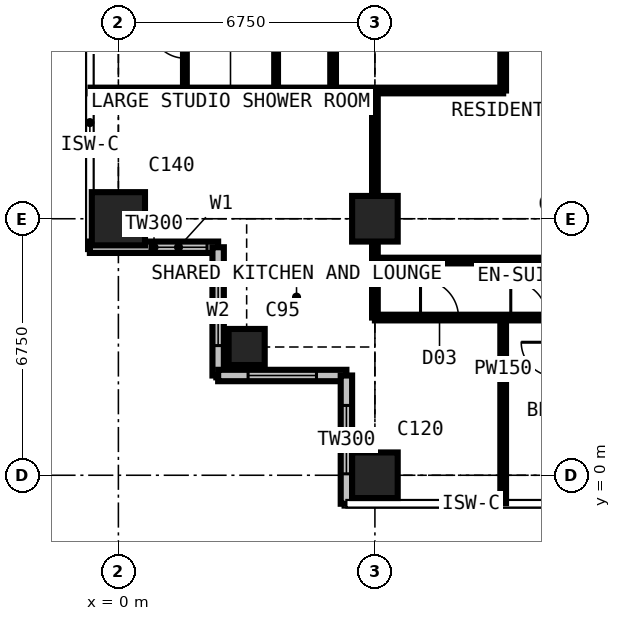
"""IFC4 building model, lengths in metres.
Left out: names, types, materials, properties, quantities, classifications, styles, units other than length and angle.
Written with IfcOpenShell. Run it as: python <this file> out.ifc"""

import sys

from ifc_helpers import new_model, si_unit, direction, frame, frame_2d, origin, origin_2d, place, context, subcontext, project, spatial, rectangle, extrude, element, fill, save


model = new_model("IFC4")
c1 = context("Model", 3, precision=1e-05, world=origin(), true_north=direction((0.0, 1.0)))
c2 = subcontext(c1, "Body", "Model", "MODEL_VIEW")
j1 = project(units=[si_unit("LENGTHUNIT", "METRE"), si_unit("PLANEANGLEUNIT", "RADIAN")], contexts=[c1])
p1 = place(None, origin())
s1 = spatial("IfcSite", under=j1, at=p1, CompositionType="ELEMENT")
p2 = place(p1, origin())
s2 = spatial("IfcBuilding", under=s1, at=p2, CompositionType="ELEMENT")
p3 = place(p2, frame((0.0, 0.0, 196.2)))
s3 = spatial("IfcBuildingStorey", under=s2, at=p3, CompositionType="ELEMENT", Elevation=196.2)
p4 = place(p3, frame((0.0, 6.75, 0.0), z_axis=(0.0, 0.0, 1.0), x_axis=(1.0, 0.0, 0.0)))
e1 = element("IfcColumn", 1, at=p4, inside=s3, PredefinedType="COLUMN", context=c2, shape_type="SweptSolid", body=[
    extrude(rectangle(XDim=1.4, YDim=1.4, at=origin_2d()), origin(), (0.0, 0.0, 1.0), 3.6),
])
p5 = place(p3, frame((3.375, 3.375, 0.0), z_axis=(0.0, 0.0, 1.0), x_axis=(1.0, 0.0, 0.0)))
e2 = element("IfcColumn", 2, at=p5, inside=s3, PredefinedType="COLUMN", context=c2, shape_type="SweptSolid", body=[
    extrude(rectangle(XDim=0.95, YDim=0.95, at=origin_2d()), origin(), (0.0, 0.0, 1.0), 3.6),
])
for number, where, z_axis, x_axis in (
    (3, (6.75, 0.0, 0.0), (0.0, 0.0, 1.0), (1.0, 0.0, 0.0)),
    (4, (6.75, 6.75, 0.0), (0.0, 0.0, 1.0), (1.0, 0.0, 0.0)),
):
    element("IfcColumn", number, at=place(p3, frame(where, z_axis=z_axis, x_axis=x_axis)), inside=s3, PredefinedType="COLUMN", context=c2, shape_type="SweptSolid", body=[
        extrude(rectangle(XDim=1.2, YDim=1.2, at=origin_2d()), origin(), (0.0, 0.0, 1.0), 3.6),
    ])
p6 = place(p3, frame((-0.75, 6.0, 0.0), z_axis=(0.0, 0.0, 1.0), x_axis=(1.0, 0.0, 0.0)))
e5 = element("IfcWall", 5, at=p6, inside=s3, PredefinedType="SOLIDWALL", context=c2, shape_type="SweptSolid", body=[
    extrude(rectangle(XDim=3.375, YDim=0.3, at=frame_2d((1.688, 0.0))), origin(), (0.0, 0.0, 1.0), 3.3),
])
p7 = place(p6, frame((1.583, 0.0, 0.9)))
e6 = element("IfcOpeningElement", 6, at=p7, cuts=e5, PredefinedType="OPENING", context=c2, shape_type="SweptSolid", body=[
    extrude(rectangle(XDim=1.5, YDim=1.8, at=frame_2d((0.75, 0.9))), frame((0.0, 0.16, 0.0), z_axis=(0.0, -1.0, 0.0), x_axis=(1.0, 0.0, 0.0)), (0.0, 0.0, 1.0), 0.32),
])
p8 = place(p3, frame((2.625, 6.0, 0.0), z_axis=(0.0, 0.0, 1.0), x_axis=(0.0, -1.0, 0.0)))
e7 = element("IfcWall", 7, at=p8, inside=s3, PredefinedType="SOLIDWALL", context=c2, shape_type="SweptSolid", body=[
    extrude(rectangle(XDim=3.375, YDim=0.3, at=frame_2d((1.688, 0.0))), origin(), (0.0, 0.0, 1.0), 3.3),
])
p9 = place(p8, frame((0.788, 0.0, 0.6)))
e8 = element("IfcOpeningElement", 8, at=p9, cuts=e7, PredefinedType="OPENING", context=c2, shape_type="SweptSolid", body=[
    extrude(rectangle(XDim=1.8, YDim=2.1, at=frame_2d((0.9, 1.05))), frame((0.0, 0.16, 0.0), z_axis=(0.0, -1.0, 0.0), x_axis=(1.0, 0.0, 0.0)), (0.0, 0.0, 1.0), 0.32),
])
p10 = place(p3, frame((2.625, 2.625, 0.0), z_axis=(0.0, 0.0, 1.0), x_axis=(1.0, 0.0, 0.0)))
e9 = element("IfcWall", 9, at=p10, inside=s3, PredefinedType="SOLIDWALL", context=c2, shape_type="SweptSolid", body=[
    extrude(rectangle(XDim=3.375, YDim=0.3, at=frame_2d((1.688, 0.0))), origin(), (0.0, 0.0, 1.0), 3.3),
])
p11 = place(p10, frame((0.788, 0.0, 0.6)))
e10 = element("IfcOpeningElement", 10, at=p11, cuts=e9, PredefinedType="OPENING", context=c2, shape_type="SweptSolid", body=[
    extrude(rectangle(XDim=1.8, YDim=2.1, at=frame_2d((0.9, 1.05))), frame((0.0, 0.16, 0.0), z_axis=(0.0, -1.0, 0.0), x_axis=(1.0, 0.0, 0.0)), (0.0, 0.0, 1.0), 0.32),
])
p12 = place(p3, frame((6.0, 2.625, 0.0), z_axis=(0.0, 0.0, 1.0), x_axis=(0.0, -1.0, 0.0)))
e11 = element("IfcWall", 11, at=p12, inside=s3, PredefinedType="SOLIDWALL", context=c2, shape_type="SweptSolid", body=[
    extrude(rectangle(XDim=3.375, YDim=0.3, at=frame_2d((1.688, 0.0))), origin(), (0.0, 0.0, 1.0), 3.3),
])
p13 = place(p12, frame((0.788, 0.0, 0.6)))
e12 = element("IfcOpeningElement", 12, at=p13, cuts=e11, PredefinedType="OPENING", context=c2, shape_type="SweptSolid", body=[
    extrude(rectangle(XDim=1.8, YDim=2.1, at=frame_2d((0.9, 1.05))), frame((0.0, 0.16, 0.0), z_axis=(0.0, -1.0, 0.0), x_axis=(1.0, 0.0, 0.0)), (0.0, 0.0, 1.0), 0.32),
])
p14 = place(p3, frame((-0.734, 10.125, 0.0), z_axis=(0.0, 0.0, 1.0), x_axis=(1.0, 0.0, 0.0)))
e13 = element("IfcWall", 13, at=p14, inside=s3, PredefinedType="PARTITIONING", context=c2, shape_type="SweptSolid", body=[
    extrude(rectangle(XDim=10.859, YDim=0.15, at=frame_2d((5.429, 0.0))), origin(), (0.0, 0.0, 1.0), 3.3),
])
p15 = place(p3, frame((1.75, 10.125, 0.0), z_axis=(0.0, 0.0, 1.0), x_axis=(0.0, 1.0, 0.0)))
e14 = element("IfcWall", 14, at=p15, inside=s3, PredefinedType="PARTITIONING", context=c2, shape_type="SweptSolid", body=[
    extrude(rectangle(XDim=2.6, YDim=0.1, at=frame_2d((1.3, 0.0))), origin(), (0.0, 0.0, 1.0), 3.3),
])
p16 = place(p15, frame((0.85, 0.0, 0.0)))
e15 = element("IfcOpeningElement", 15, at=p16, cuts=e14, PredefinedType="OPENING", context=c2, shape_type="SweptSolid", body=[
    extrude(rectangle(XDim=0.9, YDim=2.2, at=frame_2d((0.45, 1.1))), frame((0.0, 0.06, 0.0), z_axis=(0.0, -1.0, 0.0), x_axis=(1.0, 0.0, 0.0)), (0.0, 0.0, 1.0), 0.12),
])
p17 = place(p3, frame((4.15, 10.125, 0.0), z_axis=(0.0, 0.0, 1.0), x_axis=(0.0, 1.0, 0.0)))
e16 = element("IfcWall", 16, at=p17, inside=s3, PredefinedType="PARTITIONING", context=c2, shape_type="SweptSolid", body=[
    extrude(rectangle(XDim=16.875, YDim=0.1, at=frame_2d((8.438, 0.0))), origin(), (0.0, 0.0, 1.0), 3.3),
])
p18 = place(p17, frame((4.2, 0.0, 0.0)))
e17 = element("IfcOpeningElement", 17, at=p18, cuts=e16, PredefinedType="OPENING", context=c2, shape_type="SweptSolid", body=[
    extrude(rectangle(XDim=0.95, YDim=2.2, at=frame_2d((0.475, 1.1))), frame((0.0, 0.06, 0.0), z_axis=(0.0, -1.0, 0.0), x_axis=(1.0, 0.0, 0.0)), (0.0, 0.0, 1.0), 0.12),
])
p19 = place(p17, frame((10.95, 0.0, 0.0)))
e18 = element("IfcOpeningElement", 18, at=p19, cuts=e16, PredefinedType="OPENING", context=c2, shape_type="SweptSolid", body=[
    extrude(rectangle(XDim=0.95, YDim=2.2, at=frame_2d((0.475, 1.1))), frame((0.0, 0.06, 0.0), z_axis=(0.0, -1.0, 0.0), x_axis=(1.0, 0.0, 0.0)), (0.0, 0.0, 1.0), 0.12),
])
p20 = place(p3, frame((5.65, 10.125, 0.0), z_axis=(0.0, 0.0, 1.0), x_axis=(0.0, 1.0, 0.0)))
e19 = element("IfcWall", 19, at=p20, inside=s3, PredefinedType="PARTITIONING", context=c2, shape_type="SweptSolid", body=[
    extrude(rectangle(XDim=10.762, YDim=0.15, at=frame_2d((5.381, 0.0))), origin(), (0.0, 0.0, 1.0), 3.3),
])
p21 = place(p20, frame((4.9, 0.0, 0.0)))
e20 = element("IfcOpeningElement", 20, at=p21, cuts=e19, PredefinedType="OPENING", context=c2, shape_type="SweptSolid", body=[
    extrude(rectangle(XDim=0.95, YDim=2.2, at=frame_2d((0.475, 1.1))), frame((0.0, 0.085, 0.0), z_axis=(0.0, -1.0, 0.0), x_axis=(1.0, 0.0, 0.0)), (0.0, 0.0, 1.0), 0.17),
])
p22 = place(p3, frame((6.75, 4.15, 0.0), z_axis=(0.0, 0.0, 1.0), x_axis=(0.0, 1.0, 0.0)))
e21 = element("IfcWall", 21, at=p22, inside=s3, PredefinedType="PARTITIONING", context=c2, shape_type="SweptSolid", body=[
    extrude(rectangle(XDim=5.975, YDim=0.15, at=frame_2d((2.988, 0.0))), origin(), (0.0, 0.0, 1.0), 2.802),
])
p23 = place(p3, frame((6.75, 4.15, 0.0), z_axis=(0.0, 0.0, 1.0), x_axis=(1.0, 0.0, 0.0)))
e22 = element("IfcWall", 22, at=p23, inside=s3, PredefinedType="PARTITIONING", context=c2, shape_type="SweptSolid", body=[
    extrude(rectangle(XDim=20.25, YDim=0.15, at=frame_2d((10.125, 0.0))), origin(), (0.0, 0.0, 1.0), 3.3),
])
p24 = place(p23, frame((1.2, 0.0, 0.0)))
e23 = element("IfcOpeningElement", 23, at=p24, cuts=e22, PredefinedType="OPENING", context=c2, shape_type="SweptSolid", body=[
    extrude(rectangle(XDim=1.0, YDim=2.2, at=frame_2d((0.5, 1.1))), frame((0.0, 0.085, 0.0), z_axis=(0.0, -1.0, 0.0), x_axis=(1.0, 0.0, 0.0)), (0.0, 0.0, 1.0), 0.17),
])
p25 = place(p23, frame((3.575, 0.0, 0.0)))
e24 = element("IfcOpeningElement", 24, at=p25, cuts=e22, PredefinedType="OPENING", context=c2, shape_type="SweptSolid", body=[
    extrude(rectangle(XDim=0.95, YDim=2.2, at=frame_2d((0.475, 1.1))), frame((0.0, 0.085, 0.0), z_axis=(0.0, -1.0, 0.0), x_axis=(1.0, 0.0, 0.0)), (0.0, 0.0, 1.0), 0.17),
])
p26 = place(p23, frame((7.0, 0.0, 0.0)))
e25 = element("IfcOpeningElement", 25, at=p26, cuts=e22, PredefinedType="OPENING", context=c2, shape_type="SweptSolid", body=[
    extrude(rectangle(XDim=0.95, YDim=2.2, at=frame_2d((0.475, 1.1))), frame((0.0, 0.085, 0.0), z_axis=(0.0, -1.0, 0.0), x_axis=(1.0, 0.0, 0.0)), (0.0, 0.0, 1.0), 0.17),
])
p27 = place(p23, frame((10.375, 0.0, 0.0)))
e26 = element("IfcOpeningElement", 26, at=p27, cuts=e22, PredefinedType="OPENING", context=c2, shape_type="SweptSolid", body=[
    extrude(rectangle(XDim=0.95, YDim=2.2, at=frame_2d((0.475, 1.1))), frame((0.0, 0.085, 0.0), z_axis=(0.0, -1.0, 0.0), x_axis=(1.0, 0.0, 0.0)), (0.0, 0.0, 1.0), 0.17),
])
p28 = place(p23, frame((15.1, 0.0, 0.0)))
e27 = element("IfcOpeningElement", 27, at=p28, cuts=e22, PredefinedType="OPENING", context=c2, shape_type="SweptSolid", body=[
    extrude(rectangle(XDim=0.95, YDim=2.2, at=frame_2d((0.475, 1.1))), frame((0.0, 0.085, 0.0), z_axis=(0.0, -1.0, 0.0), x_axis=(1.0, 0.0, 0.0)), (0.0, 0.0, 1.0), 0.17),
])
p29 = place(p3, frame((6.75, 5.65, 0.0), z_axis=(0.0, 0.0, 1.0), x_axis=(1.0, 0.0, 0.0)))
e28 = element("IfcWall", 28, at=p29, inside=s3, PredefinedType="PARTITIONING", context=c2, shape_type="SweptSolid", body=[
    extrude(rectangle(XDim=11.05, YDim=0.15, at=frame_2d((5.525, 0.0))), origin(), (0.0, 0.0, 1.0), 3.3),
])
p30 = place(p3, frame((10.125, -0.734, 0.0), z_axis=(0.0, 0.0, 1.0), x_axis=(0.0, 1.0, 0.0)))
e29 = element("IfcWall", 29, at=p30, inside=s3, PredefinedType="PARTITIONING", context=c2, shape_type="SweptSolid", body=[
    extrude(rectangle(XDim=4.884, YDim=0.15, at=frame_2d((2.442, 0.0))), origin(), (0.0, 0.0, 1.0), 3.3),
])
p31 = place(p3, frame((10.125, 10.125, 0.0), z_axis=(0.0, 0.0, 1.0), x_axis=(0.0, 1.0, 0.0)))
e30 = element("IfcWall", 30, at=p31, inside=s3, PredefinedType="PARTITIONING", context=c2, shape_type="SweptSolid", body=[
    extrude(rectangle(XDim=1.175, YDim=0.15, at=frame_2d((0.587, 0.0))), origin(), (0.0, 0.0, 1.0), 3.3),
])
p32 = place(p7, origin())
e31 = element("IfcWindow", 31, at=p32, inside=s3, PartitioningType="SINGLE_PANEL", PredefinedType="WINDOW", context=c2, shape_type="SweptSolid", body=[
    extrude(rectangle(XDim=1.5, YDim=1.8, at=frame_2d((0.75, 0.9))), frame((0.0, 0.03, 0.0), z_axis=(0.0, -1.0, 0.0), x_axis=(1.0, 0.0, 0.0)), (0.0, 0.0, 1.0), 0.06),
])
fill(e6, e31)
p33 = place(p9, origin())
e32 = element("IfcWindow", 32, at=p33, inside=s3, PartitioningType="SINGLE_PANEL", PredefinedType="WINDOW", context=c2, shape_type="SweptSolid", body=[
    extrude(rectangle(XDim=1.8, YDim=2.1, at=frame_2d((0.9, 1.05))), frame((0.0, 0.03, 0.0), z_axis=(0.0, -1.0, 0.0), x_axis=(1.0, 0.0, 0.0)), (0.0, 0.0, 1.0), 0.06),
])
fill(e8, e32)
p34 = place(p11, origin())
e33 = element("IfcWindow", 33, at=p34, inside=s3, PartitioningType="SINGLE_PANEL", PredefinedType="WINDOW", context=c2, shape_type="SweptSolid", body=[
    extrude(rectangle(XDim=1.8, YDim=2.1, at=frame_2d((0.9, 1.05))), frame((0.0, 0.03, 0.0), z_axis=(0.0, -1.0, 0.0), x_axis=(1.0, 0.0, 0.0)), (0.0, 0.0, 1.0), 0.06),
])
fill(e10, e33)
p35 = place(p13, origin())
e34 = element("IfcWindow", 34, at=p35, inside=s3, PartitioningType="SINGLE_PANEL", PredefinedType="WINDOW", context=c2, shape_type="SweptSolid", body=[
    extrude(rectangle(XDim=1.8, YDim=2.1, at=frame_2d((0.9, 1.05))), frame((0.0, 0.03, 0.0), z_axis=(0.0, -1.0, 0.0), x_axis=(1.0, 0.0, 0.0)), (0.0, 0.0, 1.0), 0.06),
])
fill(e12, e34)
p36 = place(p24, origin())
e35 = element("IfcDoor", 35, at=p36, inside=s3, OperationType="SINGLE_SWING_LEFT", PredefinedType="DOOR", context=c2, shape_type="SweptSolid", body=[
    extrude(rectangle(XDim=1.0, YDim=2.2, at=frame_2d((0.5, 1.1))), frame((0.0, 0.025, 0.0), z_axis=(0.0, -1.0, 0.0), x_axis=(1.0, 0.0, 0.0)), (0.0, 0.0, 1.0), 0.05),
])
fill(e23, e35)
p37 = place(p25, origin())
e36 = element("IfcDoor", 36, at=p37, inside=s3, OperationType="SINGLE_SWING_LEFT", PredefinedType="DOOR", context=c2, shape_type="SweptSolid", body=[
    extrude(rectangle(XDim=0.95, YDim=2.2, at=frame_2d((0.475, 1.1))), frame((0.0, 0.025, 0.0), z_axis=(0.0, -1.0, 0.0), x_axis=(1.0, 0.0, 0.0)), (0.0, 0.0, 1.0), 0.05),
])
fill(e24, e36)
p38 = place(p16, origin())
e37 = element("IfcDoor", 37, at=p38, inside=s3, OperationType="SINGLE_SWING_RIGHT", PredefinedType="DOOR", context=c2, shape_type="SweptSolid", body=[
    extrude(rectangle(XDim=0.9, YDim=2.2, at=frame_2d((0.45, 1.1))), frame((0.0, 0.025, 0.0), z_axis=(0.0, -1.0, 0.0), x_axis=(1.0, 0.0, 0.0)), (0.0, 0.0, 1.0), 0.05),
])
fill(e15, e37)
save(model, sys.argv[1])
